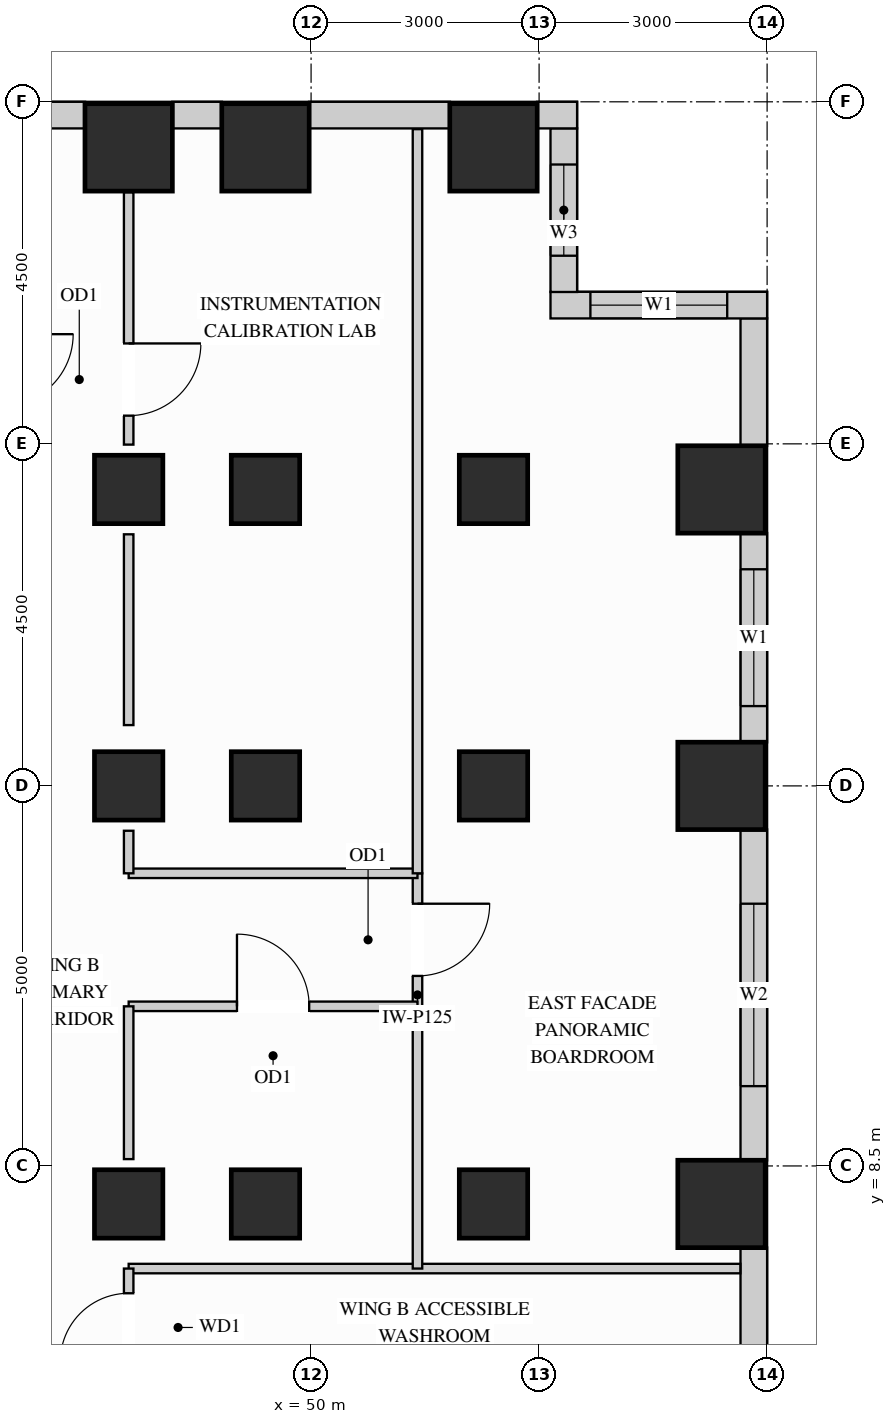
"""IFC4 building model, lengths in metres.
Left out: names, types, materials, properties, quantities, classifications, styles, units other than length and angle.
Written with IfcOpenShell. Run it as: python <this file> out.ifc"""

import sys

from ifc_helpers import new_model, si_unit, direction, frame, frame_2d, origin, origin_2d, place, context, subcontext, project, spatial, rectangle, extrude, source, transform, mapped, element, fill, save


model = new_model("IFC4")
c1 = context("Model", 3, precision=1e-05, world=origin(), true_north=direction((0.0, 1.0)))
c2 = subcontext(c1, "Body", "Model", "MODEL_VIEW")
j1 = project(units=[si_unit("LENGTHUNIT", "METRE"), si_unit("PLANEANGLEUNIT", "RADIAN")], contexts=[c1])
p1 = place(None, origin())
s1 = spatial("IfcSite", under=j1, at=p1, CompositionType="ELEMENT")
p2 = place(p1, origin())
s2 = spatial("IfcBuilding", under=s1, at=p2, CompositionType="ELEMENT")
p3 = place(p2, frame((0.0, 0.0, 95.4)))
s3 = spatial("IfcBuildingStorey", under=s2, at=p3, CompositionType="ELEMENT", Elevation=95.4)
m1 = source(origin(), c2, "Body", "SweptSolid", [
    extrude(rectangle(XDim=0.9, YDim=0.9, at=origin_2d()), origin(), (0.0, 0.0, 1.0), 3.38),
])
for number, where, z_axis, x_axis in (
    (1, (47.6, 13.5, 0.0), (0.0, 0.0, 1.0), (1.0, 0.0, 0.0)),
    (2, (47.6, 8.0, 0.0), (0.0, 0.0, 1.0), (1.0, 0.0, 0.0)),
    (3, (47.6, 17.4, 0.0), (0.0, 0.0, 1.0), (1.0, 0.0, 0.0)),
    (4, (49.4, 13.5, 0.0), (0.0, 0.0, 1.0), (1.0, 0.0, 0.0)),
    (5, (49.4, 17.4, 0.0), (0.0, 0.0, 1.0), (1.0, 0.0, 0.0)),
    (6, (49.4, 8.0, 0.0), (0.0, 0.0, 1.0), (1.0, 0.0, 0.0)),
    (7, (52.4, 13.5, 0.0), (0.0, 0.0, 1.0), (1.0, 0.0, 0.0)),
    (8, (52.4, 17.4, 0.0), (0.0, 0.0, 1.0), (1.0, 0.0, 0.0)),
    (9, (52.4, 8.0, 0.0), (0.0, 0.0, 1.0), (1.0, 0.0, 0.0)),
):
    element("IfcColumn", number, at=place(p3, frame(where, z_axis=z_axis, x_axis=x_axis)), inside=s3, PredefinedType="COLUMN", context=c2, shape_type="MappedRepresentation", body=[
        mapped(m1, transform((0.0, 0.0, 0.0), x_axis=(1.0, 0.0, 0.0), y_axis=(0.0, 1.0, 0.0), z_axis=(0.0, 0.0, 1.0))),
    ])
m2 = source(origin(), c2, "Body", "SweptSolid", [
    extrude(rectangle(XDim=1.15, YDim=1.15, at=origin_2d()), origin(), (0.0, 0.0, 1.0), 3.38),
])
for number, where, z_axis, x_axis in (
    (10, (47.6, 21.9, 0.0), (0.0, 0.0, 1.0), (1.0, 0.0, 0.0)),
    (11, (49.4, 21.9, 0.0), (0.0, 0.0, 1.0), (1.0, 0.0, 0.0)),
    (12, (52.4, 21.9, 0.0), (0.0, 0.0, 1.0), (1.0, 0.0, 0.0)),
    (13, (55.4, 13.5, 0.0), (0.0, 0.0, 1.0), (1.0, 0.0, 0.0)),
    (14, (55.4, 17.4, 0.0), (0.0, 0.0, 1.0), (1.0, 0.0, 0.0)),
    (15, (55.4, 8.0, 0.0), (0.0, 0.0, 1.0), (1.0, 0.0, 0.0)),
):
    element("IfcColumn", number, at=place(p3, frame(where, z_axis=z_axis, x_axis=x_axis)), inside=s3, PredefinedType="COLUMN", context=c2, shape_type="MappedRepresentation", body=[
        mapped(m2, transform((0.0, 0.0, 0.0), x_axis=(1.0, 0.0, 0.0), y_axis=(0.0, 1.0, 0.0), z_axis=(0.0, 0.0, 1.0))),
    ])
m3 = source(origin(), c2, "Body", "SweptSolid", [
    extrude(rectangle(XDim=3.354, YDim=0.35, at=frame_2d((1.677, 0.0))), origin(), (0.0, 0.0, 1.0), 3.365),
])
p4 = place(p3, frame((55.825, 4.073, 0.0), z_axis=(0.0, 0.0, 1.0), x_axis=(0.0, 1.0, 0.0)))
e16 = element("IfcWall", 16, at=p4, inside=s3, PredefinedType="SOLIDWALL", context=c2, shape_type="MappedRepresentation", body=[
    mapped(m3, transform((0.0, 0.0, 0.0), x_axis=(1.0, 0.0, 0.0), y_axis=(0.0, 1.0, 0.0), z_axis=(0.0, 0.0, 1.0))),
])
p5 = place(p3, frame((55.825, 8.573, 0.0), z_axis=(0.0, 0.0, 1.0), x_axis=(0.0, 1.0, 0.0)))
e17 = element("IfcWall", 17, at=p5, inside=s3, PredefinedType="SOLIDWALL", context=c2, shape_type="SweptSolid", body=[
    extrude(rectangle(XDim=4.354, YDim=0.35, at=frame_2d((2.177, 0.0))), origin(), (0.0, 0.0, 1.0), 3.365),
])
p6 = place(p5, frame((0.977, 0.0, 0.78)))
e18 = element("IfcOpeningElement", 18, at=p6, cuts=e17, PredefinedType="OPENING", context=c2, shape_type="SweptSolid", body=[
    extrude(rectangle(XDim=2.4, YDim=2.1, at=frame_2d((1.2, 1.05))), frame((0.0, 0.185, 0.0), z_axis=(0.0, -1.0, 0.0), x_axis=(1.0, 0.0, 0.0)), (0.0, 0.0, 1.0), 0.37),
])
p7 = place(p3, frame((55.825, 14.073, 0.0), z_axis=(0.0, 0.0, 1.0), x_axis=(0.0, 1.0, 0.0)))
e19 = element("IfcWall", 19, at=p7, inside=s3, PredefinedType="SOLIDWALL", context=c2, shape_type="SweptSolid", body=[
    extrude(rectangle(XDim=2.754, YDim=0.35, at=frame_2d((1.377, 0.0))), origin(), (0.0, 0.0, 1.0), 3.365),
])
p8 = place(p7, frame((0.477, 0.0, 0.78)))
e20 = element("IfcOpeningElement", 20, at=p8, cuts=e19, PredefinedType="OPENING", context=c2, shape_type="SweptSolid", body=[
    extrude(rectangle(XDim=1.8, YDim=2.1, at=frame_2d((0.9, 1.05))), frame((0.0, 0.185, 0.0), z_axis=(0.0, -1.0, 0.0), x_axis=(1.0, 0.0, 0.0)), (0.0, 0.0, 1.0), 0.37),
])
m4 = source(origin(), c2, "Body", "SweptSolid", [
    extrude(rectangle(XDim=1.679, YDim=0.35, at=frame_2d((0.84, 0.0))), origin(), (0.0, 0.0, 1.0), 3.365),
])
p9 = place(p3, frame((55.825, 17.973, 0.0), z_axis=(0.0, 0.0, 1.0), x_axis=(0.0, 1.0, 0.0)))
e21 = element("IfcWall", 21, at=p9, inside=s3, PredefinedType="SOLIDWALL", context=c2, shape_type="MappedRepresentation", body=[
    mapped(m4, transform((0.0, 0.0, 0.0), x_axis=(1.0, 0.0, 0.0), y_axis=(0.0, 1.0, 0.0), z_axis=(0.0, 0.0, 1.0))),
])
p10 = place(p3, frame((56.0, 19.825, 0.0), z_axis=(0.0, 0.0, 1.0), x_axis=(-1.0, 0.0, 0.0)))
e22 = element("IfcWall", 22, at=p10, inside=s3, PredefinedType="SOLIDWALL", context=c2, shape_type="SweptSolid", body=[
    extrude(rectangle(XDim=2.85, YDim=0.35, at=frame_2d((1.425, 0.0))), origin(), (0.0, 0.0, 1.0), 3.365),
])
p11 = place(p10, frame((0.525, 0.0, 0.78)))
e23 = element("IfcOpeningElement", 23, at=p11, cuts=e22, PredefinedType="OPENING", context=c2, shape_type="SweptSolid", body=[
    extrude(rectangle(XDim=1.8, YDim=2.1, at=frame_2d((0.9, 1.05))), frame((0.0, 0.185, 0.0), z_axis=(0.0, -1.0, 0.0), x_axis=(1.0, 0.0, 0.0)), (0.0, 0.0, 1.0), 0.37),
])
p12 = place(p3, frame((53.325, 19.998, 0.0), z_axis=(0.0, 0.0, 1.0), x_axis=(0.0, 1.0, 0.0)))
e24 = element("IfcWall", 24, at=p12, inside=s3, PredefinedType="SOLIDWALL", context=c2, shape_type="SweptSolid", body=[
    extrude(rectangle(XDim=2.154, YDim=0.35, at=frame_2d((1.077, 0.0))), origin(), (0.0, 0.0, 1.0), 3.365),
])
p13 = place(p12, frame((0.477, 0.0, 0.78)))
e25 = element("IfcOpeningElement", 25, at=p13, cuts=e24, PredefinedType="OPENING", context=c2, shape_type="SweptSolid", body=[
    extrude(rectangle(XDim=1.2, YDim=2.1, at=frame_2d((0.6, 1.05))), frame((0.0, 0.185, 0.0), z_axis=(0.0, -1.0, 0.0), x_axis=(1.0, 0.0, 0.0)), (0.0, 0.0, 1.0), 0.37),
])
m5 = source(origin(), c2, "Body", "SweptSolid", [
    extrude(rectangle(XDim=0.527, YDim=0.35, at=frame_2d((0.264, 0.0))), origin(), (0.0, 0.0, 1.0), 3.365),
])
p14 = place(p3, frame((53.5, 22.325, 0.0), z_axis=(0.0, 0.0, 1.0), x_axis=(-1.0, 0.0, 0.0)))
e26 = element("IfcWall", 26, at=p14, inside=s3, PredefinedType="SOLIDWALL", context=c2, shape_type="MappedRepresentation", body=[
    mapped(m5, transform((0.0, 0.0, 0.0), x_axis=(1.0, 0.0, 0.0), y_axis=(0.0, 1.0, 0.0), z_axis=(0.0, 0.0, 1.0))),
])
m6 = source(origin(), c2, "Body", "SweptSolid", [
    extrude(rectangle(XDim=1.854, YDim=0.35, at=frame_2d((0.927, 0.0))), origin(), (0.0, 0.0, 1.0), 3.365),
])
p15 = place(p3, frame((51.827, 22.325, 0.0), z_axis=(0.0, 0.0, 1.0), x_axis=(-1.0, 0.0, 0.0)))
e27 = element("IfcWall", 27, at=p15, inside=s3, PredefinedType="SOLIDWALL", context=c2, shape_type="MappedRepresentation", body=[
    mapped(m6, transform((0.0, 0.0, 0.0), x_axis=(1.0, 0.0, 0.0), y_axis=(0.0, 1.0, 0.0), z_axis=(0.0, 0.0, 1.0))),
])
m7 = source(origin(), c2, "Body", "SweptSolid", [
    extrude(rectangle(XDim=0.654, YDim=0.35, at=frame_2d((0.327, 0.0))), origin(), (0.0, 0.0, 1.0), 3.365),
])
p16 = place(p3, frame((48.827, 22.325, 0.0), z_axis=(0.0, 0.0, 1.0), x_axis=(-1.0, 0.0, 0.0)))
e28 = element("IfcWall", 28, at=p16, inside=s3, PredefinedType="SOLIDWALL", context=c2, shape_type="MappedRepresentation", body=[
    mapped(m7, transform((0.0, 0.0, 0.0), x_axis=(1.0, 0.0, 0.0), y_axis=(0.0, 1.0, 0.0), z_axis=(0.0, 0.0, 1.0))),
])
p17 = place(p3, frame((47.027, 22.325, 0.0), z_axis=(0.0, 0.0, 1.0), x_axis=(-1.0, 0.0, 0.0)))
e29 = element("IfcWall", 29, at=p17, inside=s3, PredefinedType="SOLIDWALL", context=c2, shape_type="SweptSolid", body=[
    extrude(rectangle(XDim=6.454, YDim=0.35, at=frame_2d((3.227, 0.0))), origin(), (0.0, 0.0, 1.0), 3.365),
])
p18 = place(p17, frame((1.749, 0.0, 0.78)))
e30 = element("IfcOpeningElement", 30, at=p18, cuts=e29, PredefinedType="OPENING", context=c2, shape_type="SweptSolid", body=[
    extrude(rectangle(XDim=1.8, YDim=2.1, at=frame_2d((0.9, 1.05))), frame((0.0, 0.185, 0.0), z_axis=(0.0, -1.0, 0.0), x_axis=(1.0, 0.0, 0.0)), (0.0, 0.0, 1.0), 0.37),
])
p19 = place(p17, frame((3.942, 0.0, 0.78)))
e31 = element("IfcOpeningElement", 31, at=p19, cuts=e29, PredefinedType="OPENING", context=c2, shape_type="SweptSolid", body=[
    extrude(rectangle(XDim=1.8, YDim=2.1, at=frame_2d((0.9, 1.05))), frame((0.0, 0.185, 0.0), z_axis=(0.0, -1.0, 0.0), x_axis=(1.0, 0.0, 0.0)), (0.0, 0.0, 1.0), 0.37),
])
p20 = place(p3, frame((51.4, 10.6, 0.0), z_axis=(0.0, 0.0, 1.0), x_axis=(0.0, 1.0, 0.0)))
e32 = element("IfcWall", 32, at=p20, inside=s3, PredefinedType="PARTITIONING", context=c2, shape_type="SweptSolid", body=[
    extrude(rectangle(XDim=1.75, YDim=0.125, at=frame_2d((0.875, 0.0))), origin(), (0.0, 0.0, 1.0), 3.365),
])
p21 = place(p20, frame((0.4, 0.0, 0.0)))
e33 = element("IfcOpeningElement", 33, at=p21, cuts=e32, PredefinedType="OPENING", context=c2, shape_type="SweptSolid", body=[
    extrude(rectangle(XDim=0.95, YDim=2.15, at=frame_2d((0.475, 1.075))), frame((0.0, 0.073, 0.0), z_axis=(0.0, -1.0, 0.0), x_axis=(1.0, 0.0, 0.0)), (0.0, 0.0, 1.0), 0.145),
])
m8 = source(origin(), c2, "Body", "SweptSolid", [
    extrude(rectangle(XDim=8.048, YDim=0.125, at=frame_2d((4.024, 0.0))), origin(), (0.0, 0.0, 1.0), 3.365),
])
p22 = place(p3, frame((47.6, 7.15, 0.0), z_axis=(0.0, 0.0, 1.0), x_axis=(1.0, 0.0, 0.0)))
e34 = element("IfcWall", 34, at=p22, inside=s3, PredefinedType="PARTITIONING", context=c2, shape_type="MappedRepresentation", body=[
    mapped(m8, transform((0.0, 0.0, 0.0), x_axis=(1.0, 0.0, 0.0), y_axis=(0.0, 1.0, 0.0), z_axis=(0.0, 0.0, 1.0))),
])
m9 = source(origin(), c2, "Body", "SweptSolid", [
    extrude(rectangle(XDim=3.8, YDim=0.125, at=frame_2d((1.9, 0.0))), origin(), (0.0, 0.0, 1.0), 3.365),
])
p23 = place(p3, frame((47.6, 12.35, 0.0), z_axis=(0.0, 0.0, 1.0), x_axis=(1.0, 0.0, 0.0)))
e35 = element("IfcWall", 35, at=p23, inside=s3, PredefinedType="PARTITIONING", context=c2, shape_type="MappedRepresentation", body=[
    mapped(m9, transform((0.0, 0.0, 0.0), x_axis=(1.0, 0.0, 0.0), y_axis=(0.0, 1.0, 0.0), z_axis=(0.0, 0.0, 1.0))),
])
p24 = place(p3, frame((47.6, 10.6, 0.0), z_axis=(0.0, 0.0, 1.0), x_axis=(1.0, 0.0, 0.0)))
e36 = element("IfcWall", 36, at=p24, inside=s3, PredefinedType="PARTITIONING", context=c2, shape_type="SweptSolid", body=[
    extrude(rectangle(XDim=3.8, YDim=0.125, at=frame_2d((1.9, 0.0))), origin(), (0.0, 0.0, 1.0), 2.677),
])
p25 = place(p24, frame((1.425, 0.0, 0.0)))
e37 = element("IfcOpeningElement", 37, at=p25, cuts=e36, PredefinedType="OPENING", context=c2, shape_type="SweptSolid", body=[
    extrude(rectangle(XDim=0.95, YDim=2.15, at=frame_2d((0.475, 1.075))), frame((0.0, 0.073, 0.0), z_axis=(0.0, -1.0, 0.0), x_axis=(1.0, 0.0, 0.0)), (0.0, 0.0, 1.0), 0.145),
])
m10 = source(origin(), c2, "Body", "SweptSolid", [
    extrude(rectangle(XDim=3.45, YDim=0.125, at=frame_2d((1.725, 0.0))), origin(), (0.0, 0.0, 1.0), 3.365),
])
p26 = place(p3, frame((51.4, 7.15, 0.0), z_axis=(0.0, 0.0, 1.0), x_axis=(0.0, 1.0, 0.0)))
e38 = element("IfcWall", 38, at=p26, inside=s3, PredefinedType="PARTITIONING", context=c2, shape_type="MappedRepresentation", body=[
    mapped(m10, transform((0.0, 0.0, 0.0), x_axis=(1.0, 0.0, 0.0), y_axis=(0.0, 1.0, 0.0), z_axis=(0.0, 0.0, 1.0))),
])
m11 = source(origin(), c2, "Body", "SweptSolid", [
    extrude(rectangle(XDim=9.79, YDim=0.125, at=frame_2d((4.895, 0.0))), origin(), (0.0, 0.0, 1.0), 3.365),
])
p27 = place(p3, frame((51.4, 12.35, 0.0), z_axis=(0.0, 0.0, 1.0), x_axis=(0.0, 1.0, 0.0)))
e39 = element("IfcWall", 39, at=p27, inside=s3, PredefinedType="PARTITIONING", context=c2, shape_type="MappedRepresentation", body=[
    mapped(m11, transform((0.0, 0.0, 0.0), x_axis=(1.0, 0.0, 0.0), y_axis=(0.0, 1.0, 0.0), z_axis=(0.0, 0.0, 1.0))),
])
m12 = source(origin(), c2, "Body", "SweptSolid", [
    extrude(rectangle(XDim=2.01, YDim=0.125, at=frame_2d((1.005, 0.0))), origin(), (0.0, 0.0, 1.0), 2.677),
])
p28 = place(p3, frame((47.6, 8.59, 0.0), z_axis=(0.0, 0.0, 1.0), x_axis=(0.0, 1.0, 0.0)))
e40 = element("IfcWall", 40, at=p28, inside=s3, PredefinedType="PARTITIONING", context=c2, shape_type="MappedRepresentation", body=[
    mapped(m12, transform((0.0, 0.0, 0.0), x_axis=(1.0, 0.0, 0.0), y_axis=(0.0, 1.0, 0.0), z_axis=(0.0, 0.0, 1.0))),
])
m13 = source(origin(), c2, "Body", "SweptSolid", [
    extrude(rectangle(XDim=2.51, YDim=0.125, at=frame_2d((1.255, 0.0))), origin(), (0.0, 0.0, 1.0), 2.677),
])
p29 = place(p3, frame((47.6, 14.3, 0.0), z_axis=(0.0, 0.0, 1.0), x_axis=(0.0, 1.0, 0.0)))
e41 = element("IfcWall", 41, at=p29, inside=s3, PredefinedType="PARTITIONING", context=c2, shape_type="MappedRepresentation", body=[
    mapped(m13, transform((0.0, 0.0, 0.0), x_axis=(1.0, 0.0, 0.0), y_axis=(0.0, 1.0, 0.0), z_axis=(0.0, 0.0, 1.0))),
])
p30 = place(p3, frame((47.6, 17.99, 0.0), z_axis=(0.0, 0.0, 1.0), x_axis=(0.0, 1.0, 0.0)))
e42 = element("IfcWall", 42, at=p30, inside=s3, PredefinedType="PARTITIONING", context=c2, shape_type="SweptSolid", body=[
    extrude(rectangle(XDim=3.32, YDim=0.125, at=frame_2d((1.66, 0.0))), origin(), (0.0, 0.0, 1.0), 2.677),
])
p31 = place(p30, frame((0.381, 0.0, 0.0)))
e43 = element("IfcOpeningElement", 43, at=p31, cuts=e42, PredefinedType="OPENING", context=c2, shape_type="SweptSolid", body=[
    extrude(rectangle(XDim=0.95, YDim=2.15, at=frame_2d((0.475, 1.075))), frame((0.0, 0.073, 0.0), z_axis=(0.0, -1.0, 0.0), x_axis=(1.0, 0.0, 0.0)), (0.0, 0.0, 1.0), 0.145),
])
m14 = source(origin(), c2, "Body", "SweptSolid", [
    extrude(rectangle(XDim=0.56, YDim=0.125, at=frame_2d((0.28, 0.0))), origin(), (0.0, 0.0, 1.0), 2.677),
])
p32 = place(p3, frame((47.6, 12.35, 0.0), z_axis=(0.0, 0.0, 1.0), x_axis=(0.0, 1.0, 0.0)))
e44 = element("IfcWall", 44, at=p32, inside=s3, PredefinedType="PARTITIONING", context=c2, shape_type="MappedRepresentation", body=[
    mapped(m14, transform((0.0, 0.0, 0.0), x_axis=(1.0, 0.0, 0.0), y_axis=(0.0, 1.0, 0.0), z_axis=(0.0, 0.0, 1.0))),
])
p33 = place(p3, frame((47.6, 5.65, 0.0), z_axis=(0.0, 0.0, 1.0), x_axis=(0.0, 1.0, 0.0)))
e45 = element("IfcWall", 45, at=p33, inside=s3, PredefinedType="PARTITIONING", context=c2, shape_type="SweptSolid", body=[
    extrude(rectangle(XDim=1.5, YDim=0.125, at=frame_2d((0.75, 0.0))), origin(), (0.0, 0.0, 1.0), 2.677),
])
p34 = place(p33, frame((0.275, 0.0, 0.0)))
e46 = element("IfcOpeningElement", 46, at=p34, cuts=e45, PredefinedType="OPENING", context=c2, shape_type="SweptSolid", body=[
    extrude(rectangle(XDim=0.9, YDim=2.15, at=frame_2d((0.45, 1.075))), frame((0.0, 0.073, 0.0), z_axis=(0.0, -1.0, 0.0), x_axis=(1.0, 0.0, 0.0)), (0.0, 0.0, 1.0), 0.145),
])
m15 = source(origin(), c2, "Body", "SweptSolid", [
    extrude(rectangle(XDim=0.95, YDim=2.15, at=frame_2d((0.475, 1.075))), frame((0.0, 0.025, 0.0), z_axis=(0.0, -1.0, 0.0), x_axis=(1.0, 0.0, 0.0)), (0.0, 0.0, 1.0), 0.05),
])
p35 = place(p25, origin())
e47 = element("IfcDoor", 47, at=p35, inside=s3, OperationType="SINGLE_SWING_LEFT", PredefinedType="DOOR", context=c2, shape_type="MappedRepresentation", body=[
    mapped(m15, transform((0.0, 0.0, 0.0), x_axis=(1.0, 0.0, 0.0), y_axis=(0.0, 1.0, 0.0), z_axis=(0.0, 0.0, 1.0))),
])
fill(e37, e47)
p36 = place(p21, origin())
e48 = element("IfcDoor", 48, at=p36, inside=s3, OperationType="SINGLE_SWING_RIGHT", PredefinedType="DOOR", context=c2, shape_type="MappedRepresentation", body=[
    mapped(m15, transform((0.0, 0.0, 0.0), x_axis=(1.0, 0.0, 0.0), y_axis=(0.0, 1.0, 0.0), z_axis=(0.0, 0.0, 1.0))),
])
fill(e33, e48)
p37 = place(p31, origin())
e49 = element("IfcDoor", 49, at=p37, inside=s3, OperationType="SINGLE_SWING_RIGHT", PredefinedType="DOOR", context=c2, shape_type="MappedRepresentation", body=[
    mapped(m15, transform((0.0, 0.0, 0.0), x_axis=(1.0, 0.0, 0.0), y_axis=(0.0, 1.0, 0.0), z_axis=(0.0, 0.0, 1.0))),
])
fill(e43, e49)
m16 = source(origin(), c2, "Body", "SweptSolid", [
    extrude(rectangle(XDim=0.9, YDim=2.15, at=frame_2d((0.45, 1.075))), frame((0.0, 0.025, 0.0), z_axis=(0.0, -1.0, 0.0), x_axis=(1.0, 0.0, 0.0)), (0.0, 0.0, 1.0), 0.05),
])
p38 = place(p34, origin())
e50 = element("IfcDoor", 50, at=p38, inside=s3, OperationType="SINGLE_SWING_LEFT", PredefinedType="DOOR", context=c2, shape_type="MappedRepresentation", body=[
    mapped(m16, transform((0.0, 0.0, 0.0), x_axis=(1.0, 0.0, 0.0), y_axis=(0.0, 1.0, 0.0), z_axis=(0.0, 0.0, 1.0))),
])
fill(e46, e50)
m17 = source(origin(), c2, "Body", "SweptSolid", [
    extrude(rectangle(XDim=1.8, YDim=2.1, at=frame_2d((0.9, 1.05))), frame((0.0, 0.03, 0.0), z_axis=(0.0, -1.0, 0.0), x_axis=(1.0, 0.0, 0.0)), (0.0, 0.0, 1.0), 0.06),
])
p39 = place(p8, origin())
e51 = element("IfcWindow", 51, at=p39, inside=s3, PartitioningType="SINGLE_PANEL", PredefinedType="WINDOW", context=c2, shape_type="MappedRepresentation", body=[
    mapped(m17, transform((0.0, 0.0, 0.0), x_axis=(1.0, 0.0, 0.0), y_axis=(0.0, 1.0, 0.0), z_axis=(0.0, 0.0, 1.0))),
])
fill(e20, e51)
p40 = place(p11, origin())
e52 = element("IfcWindow", 52, at=p40, inside=s3, PartitioningType="SINGLE_PANEL", PredefinedType="WINDOW", context=c2, shape_type="MappedRepresentation", body=[
    mapped(m17, transform((0.0, 0.0, 0.0), x_axis=(1.0, 0.0, 0.0), y_axis=(0.0, 1.0, 0.0), z_axis=(0.0, 0.0, 1.0))),
])
fill(e23, e52)
m18 = source(origin(), c2, "Body", "SweptSolid", [
    extrude(rectangle(XDim=2.4, YDim=2.1, at=frame_2d((1.2, 1.05))), frame((0.0, 0.03, 0.0), z_axis=(0.0, -1.0, 0.0), x_axis=(1.0, 0.0, 0.0)), (0.0, 0.0, 1.0), 0.06),
])
p41 = place(p6, origin())
e53 = element("IfcWindow", 53, at=p41, inside=s3, PartitioningType="SINGLE_PANEL", PredefinedType="WINDOW", context=c2, shape_type="MappedRepresentation", body=[
    mapped(m18, transform((0.0, 0.0, 0.0), x_axis=(1.0, 0.0, 0.0), y_axis=(0.0, 1.0, 0.0), z_axis=(0.0, 0.0, 1.0))),
])
fill(e18, e53)
m19 = source(origin(), c2, "Body", "SweptSolid", [
    extrude(rectangle(XDim=1.2, YDim=2.1, at=frame_2d((0.6, 1.05))), frame((0.0, 0.03, 0.0), z_axis=(0.0, -1.0, 0.0), x_axis=(1.0, 0.0, 0.0)), (0.0, 0.0, 1.0), 0.06),
])
p42 = place(p13, origin())
e54 = element("IfcWindow", 54, at=p42, inside=s3, PartitioningType="SINGLE_PANEL", PredefinedType="WINDOW", context=c2, shape_type="MappedRepresentation", body=[
    mapped(m19, transform((0.0, 0.0, 0.0), x_axis=(1.0, 0.0, 0.0), y_axis=(0.0, 1.0, 0.0), z_axis=(0.0, 0.0, 1.0))),
])
fill(e25, e54)
save(model, sys.argv[1])
